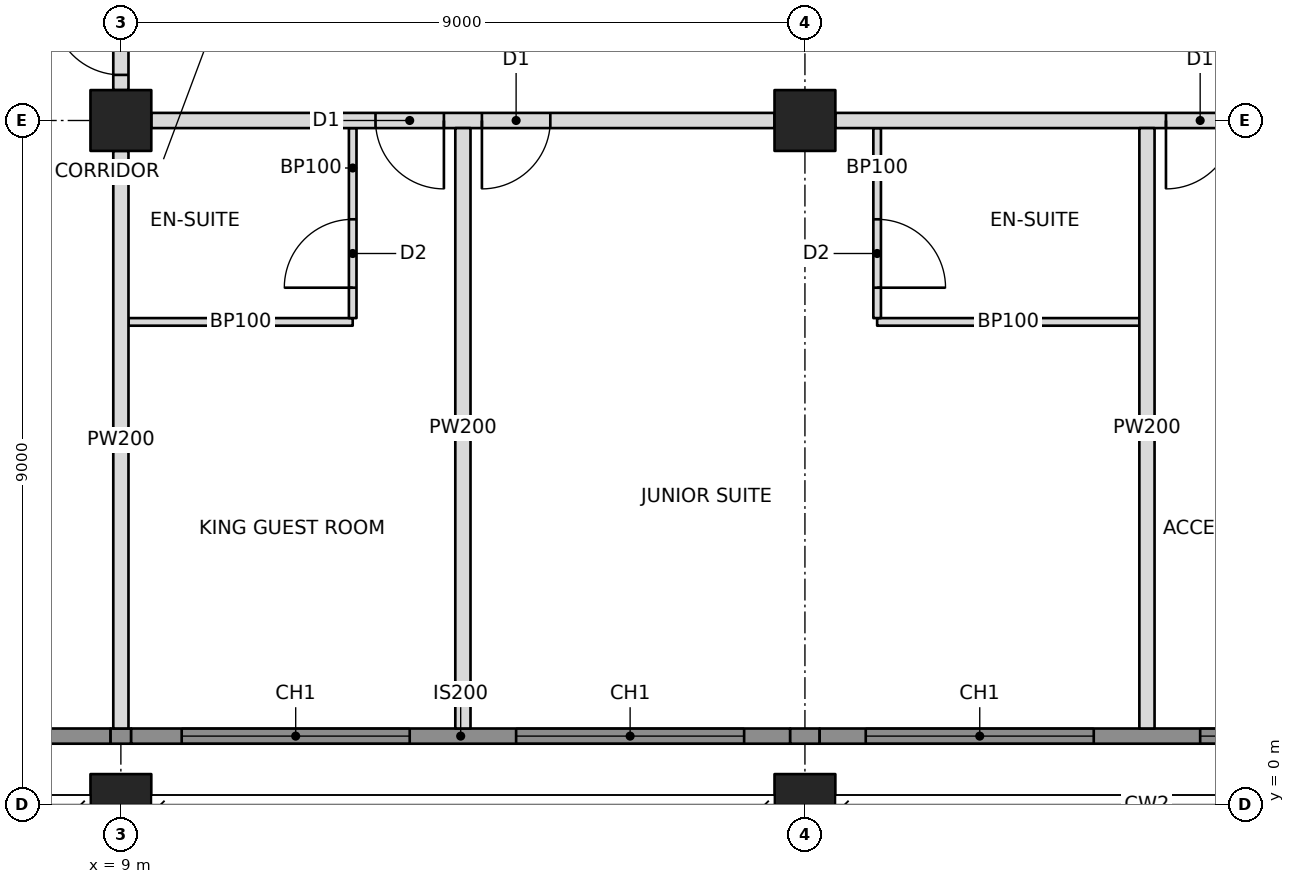
"""IFC4 building model, lengths in metres.
Left out: names, types, materials, properties, quantities, classifications, styles, units other than length and angle.
Written with IfcOpenShell. Run it as: python <this file> out.ifc"""

import sys

from ifc_helpers import new_model, si_unit, direction, frame, frame_2d, origin, origin_2d, place, context, subcontext, project, spatial, rectangle, hollow_rectangle, extrude, element, fill, save


model = new_model("IFC4")
c1 = context("Model", 3, precision=1e-05, world=origin(), true_north=direction((0.0, 1.0)))
c2 = subcontext(c1, "Body", "Model", "MODEL_VIEW")
j1 = project(units=[si_unit("LENGTHUNIT", "METRE"), si_unit("PLANEANGLEUNIT", "RADIAN")], contexts=[c1])
p1 = place(None, origin())
s1 = spatial("IfcSite", under=j1, at=p1, CompositionType="ELEMENT")
p2 = place(p1, origin())
s2 = spatial("IfcBuilding", under=s1, at=p2, CompositionType="ELEMENT")
p3 = place(p2, frame((0.0, 0.0, 237.4)))
s3 = spatial("IfcBuildingStorey", under=s2, at=p3, CompositionType="ELEMENT", Elevation=237.4)
p4 = place(p3, frame((9.0, 0.0, 0.0), z_axis=(0.0, 0.0, 1.0), x_axis=(1.0, 0.0, 0.0)))
e1 = element("IfcColumn", 1, at=p4, inside=s3, PredefinedType="COLUMN", context=c2, shape_type="SweptSolid", body=[
    extrude(hollow_rectangle(XDim=0.8, YDim=0.8, WallThickness=0.05, at=origin_2d()), origin(), (0.0, 0.0, 1.0), 3.6),
])
p5 = place(p3, frame((9.0, 9.0, 0.0), z_axis=(0.0, 0.0, 1.0), x_axis=(1.0, 0.0, 0.0)))
e2 = element("IfcColumn", 2, at=p5, inside=s3, PredefinedType="COLUMN", context=c2, shape_type="SweptSolid", body=[
    extrude(hollow_rectangle(XDim=0.8, YDim=0.8, WallThickness=0.04, at=origin_2d()), origin(), (0.0, 0.0, 1.0), 3.6),
])
p6 = place(p3, frame((18.0, 0.0, 0.0), z_axis=(0.0, 0.0, 1.0), x_axis=(1.0, 0.0, 0.0)))
e3 = element("IfcColumn", 3, at=p6, inside=s3, PredefinedType="COLUMN", context=c2, shape_type="SweptSolid", body=[
    extrude(hollow_rectangle(XDim=0.8, YDim=0.8, WallThickness=0.05, at=origin_2d()), origin(), (0.0, 0.0, 1.0), 3.6),
])
p7 = place(p3, frame((18.0, 9.0, 0.0), z_axis=(0.0, 0.0, 1.0), x_axis=(1.0, 0.0, 0.0)))
e4 = element("IfcColumn", 4, at=p7, inside=s3, PredefinedType="COLUMN", context=c2, shape_type="SweptSolid", body=[
    extrude(hollow_rectangle(XDim=0.8, YDim=0.8, WallThickness=0.04, at=origin_2d()), origin(), (0.0, 0.0, 1.0), 3.6),
])
p8 = place(p3, frame((3.0, 0.9, 0.0), z_axis=(0.0, 0.0, 1.0), x_axis=(1.0, 0.0, 0.0)))
e5 = element("IfcWall", 5, at=p8, inside=s3, PredefinedType="SOLIDWALL", context=c2, shape_type="SweptSolid", body=[
    extrude(rectangle(XDim=5.865, YDim=0.2, at=frame_2d((2.932, 0.0))), origin(), (0.0, 0.0, 1.0), 3.4),
])
p9 = place(p8, frame((1.45, 0.0, 0.6)))
e6 = element("IfcOpeningElement", 6, at=p9, cuts=e5, PredefinedType="OPENING", context=c2, shape_type="SweptSolid", body=[
    extrude(rectangle(XDim=3.0, YDim=2.2, at=frame_2d((1.5, 1.1))), frame((0.0, 0.11, 0.0), z_axis=(0.0, -1.0, 0.0), x_axis=(1.0, 0.0, 0.0)), (0.0, 0.0, 1.0), 0.22),
])
p10 = place(p3, frame((9.4, 9.0, 0.0), z_axis=(0.0, 0.0, 1.0), x_axis=(1.0, 0.0, 0.0)))
e7 = element("IfcWall", 7, at=p10, inside=s3, PredefinedType="PARTITIONING", context=c2, shape_type="SweptSolid", body=[
    extrude(rectangle(XDim=8.2, YDim=0.2, at=frame_2d((4.1, 0.0))), origin(), (0.0, 0.0, 1.0), 2.605),
])
p11 = place(p10, frame((2.95, 0.0, 0.0)))
e8 = element("IfcOpeningElement", 8, at=p11, cuts=e7, PredefinedType="OPENING", context=c2, shape_type="SweptSolid", body=[
    extrude(rectangle(XDim=0.9, YDim=2.1, at=frame_2d((0.45, 1.05))), frame((0.0, 0.11, 0.0), z_axis=(0.0, -1.0, 0.0), x_axis=(1.0, 0.0, 0.0)), (0.0, 0.0, 1.0), 0.22),
])
p12 = place(p10, frame((4.35, 0.0, 0.0)))
e9 = element("IfcOpeningElement", 9, at=p12, cuts=e7, PredefinedType="OPENING", context=c2, shape_type="SweptSolid", body=[
    extrude(rectangle(XDim=0.9, YDim=2.1, at=frame_2d((0.45, 1.05))), frame((0.0, 0.11, 0.0), z_axis=(0.0, -1.0, 0.0), x_axis=(1.0, 0.0, 0.0)), (0.0, 0.0, 1.0), 0.22),
])
p13 = place(p3, frame((18.4, 9.0, 0.0), z_axis=(0.0, 0.0, 1.0), x_axis=(1.0, 0.0, 0.0)))
e10 = element("IfcWall", 10, at=p13, inside=s3, PredefinedType="PARTITIONING", context=c2, shape_type="SweptSolid", body=[
    extrude(rectangle(XDim=8.2, YDim=0.2, at=frame_2d((4.1, 0.0))), origin(), (0.0, 0.0, 1.0), 2.605),
])
p14 = place(p13, frame((4.35, 0.0, 0.0)))
e11 = element("IfcOpeningElement", 11, at=p14, cuts=e10, PredefinedType="OPENING", context=c2, shape_type="SweptSolid", body=[
    extrude(rectangle(XDim=0.9, YDim=2.1, at=frame_2d((0.45, 1.05))), frame((0.0, 0.11, 0.0), z_axis=(0.0, -1.0, 0.0), x_axis=(1.0, 0.0, 0.0)), (0.0, 0.0, 1.0), 0.22),
])
p15 = place(p3, frame((9.0, 8.6, 0.0), z_axis=(0.0, 0.0, 1.0), x_axis=(0.0, -1.0, 0.0)))
e12 = element("IfcWall", 12, at=p15, inside=s3, PredefinedType="PARTITIONING", context=c2, shape_type="SweptSolid", body=[
    extrude(rectangle(XDim=7.6, YDim=0.2, at=frame_2d((3.8, 0.0))), origin(), (0.0, 0.0, 1.0), 2.638),
])
for number, where, z_axis, x_axis in (
    (13, (13.5, 8.9, 0.0), (0.0, 0.0, 1.0), (0.0, -1.0, 0.0)),
    (14, (22.5, 8.9, 0.0), (0.0, 0.0, 1.0), (0.0, -1.0, 0.0)),
):
    element("IfcWall", number, at=place(p3, frame(where, z_axis=z_axis, x_axis=x_axis)), inside=s3, PredefinedType="PARTITIONING", context=c2, shape_type="SweptSolid", body=[
        extrude(rectangle(XDim=7.9, YDim=0.2, at=frame_2d((3.95, 0.0))), origin(), (0.0, 0.0, 1.0), 2.604),
    ])
p16 = place(p3, frame((9.1, 6.35, 0.0), z_axis=(0.0, 0.0, 1.0), x_axis=(1.0, 0.0, 0.0)))
e15 = element("IfcWall", 15, at=p16, inside=s3, PredefinedType="PARTITIONING", context=c2, shape_type="SweptSolid", body=[
    extrude(rectangle(XDim=2.95, YDim=0.1, at=frame_2d((1.475, 0.0))), origin(), (0.0, 0.0, 1.0), 2.638),
])
p17 = place(p3, frame((12.05, 8.9, 0.0), z_axis=(0.0, 0.0, 1.0), x_axis=(0.0, -1.0, 0.0)))
e16 = element("IfcWall", 16, at=p17, inside=s3, PredefinedType="PARTITIONING", context=c2, shape_type="SweptSolid", body=[
    extrude(rectangle(XDim=2.5, YDim=0.1, at=frame_2d((1.25, 0.0))), origin(), (0.0, 0.0, 1.0), 2.604),
])
p18 = place(p17, frame((1.2, 0.0, 0.0)))
e17 = element("IfcOpeningElement", 17, at=p18, cuts=e16, PredefinedType="OPENING", context=c2, shape_type="SweptSolid", body=[
    extrude(rectangle(XDim=0.9, YDim=2.1, at=frame_2d((0.45, 1.05))), frame((0.0, 0.06, 0.0), z_axis=(0.0, -1.0, 0.0), x_axis=(1.0, 0.0, 0.0)), (0.0, 0.0, 1.0), 0.12),
])
p19 = place(p3, frame((18.95, 6.35, 0.0), z_axis=(0.0, 0.0, 1.0), x_axis=(1.0, 0.0, 0.0)))
e18 = element("IfcWall", 18, at=p19, inside=s3, PredefinedType="PARTITIONING", context=c2, shape_type="SweptSolid", body=[
    extrude(rectangle(XDim=3.45, YDim=0.1, at=frame_2d((1.725, 0.0))), origin(), (0.0, 0.0, 1.0), 3.4),
])
p20 = place(p3, frame((18.95, 8.9, 0.0), z_axis=(0.0, 0.0, 1.0), x_axis=(0.0, -1.0, 0.0)))
e19 = element("IfcWall", 19, at=p20, inside=s3, PredefinedType="PARTITIONING", context=c2, shape_type="SweptSolid", body=[
    extrude(rectangle(XDim=2.5, YDim=0.1, at=frame_2d((1.25, 0.0))), origin(), (0.0, 0.0, 1.0), 2.604),
])
p21 = place(p20, frame((1.2, 0.0, 0.0)))
e20 = element("IfcOpeningElement", 20, at=p21, cuts=e19, PredefinedType="OPENING", context=c2, shape_type="SweptSolid", body=[
    extrude(rectangle(XDim=0.9, YDim=2.1, at=frame_2d((0.45, 1.05))), frame((0.0, 0.06, 0.0), z_axis=(0.0, -1.0, 0.0), x_axis=(1.0, 0.0, 0.0)), (0.0, 0.0, 1.0), 0.12),
])
p22 = place(p3, frame((9.0, 9.4, 0.0), z_axis=(0.0, 0.0, 1.0), x_axis=(0.0, 1.0, 0.0)))
e21 = element("IfcWall", 21, at=p22, inside=s3, PredefinedType="PARTITIONING", context=c2, shape_type="SweptSolid", body=[
    extrude(rectangle(XDim=1.3, YDim=0.2, at=frame_2d((0.65, 0.0))), origin(), (0.0, 0.0, 1.0), 2.605),
])
p23 = place(p22, frame((0.2, 0.0, 0.0)))
e22 = element("IfcOpeningElement", 22, at=p23, cuts=e21, PredefinedType="OPENING", context=c2, shape_type="SweptSolid", body=[
    extrude(rectangle(XDim=0.9, YDim=2.1, at=frame_2d((0.45, 1.05))), frame((0.0, 0.11, 0.0), z_axis=(0.0, -1.0, 0.0), x_axis=(1.0, 0.0, 0.0)), (0.0, 0.0, 1.0), 0.22),
])
p24 = place(p3, frame((8.865, 0.9, 0.0), z_axis=(0.0, 0.0, 1.0), x_axis=(1.0, 0.0, 0.0)))
e23 = element("IfcWall", 23, at=p24, inside=s3, PredefinedType="SOLIDWALL", context=c2, shape_type="SweptSolid", body=[
    extrude(rectangle(XDim=0.271, YDim=0.2, at=frame_2d((0.135, 0.0))), origin(), (0.0, 0.0, 1.0), 2.638),
])
p25 = place(p3, frame((9.135, 0.9, 0.0), z_axis=(0.0, 0.0, 1.0), x_axis=(1.0, 0.0, 0.0)))
e24 = element("IfcWall", 24, at=p25, inside=s3, PredefinedType="SOLIDWALL", context=c2, shape_type="SweptSolid", body=[
    extrude(rectangle(XDim=8.671, YDim=0.2, at=frame_2d((4.335, 0.0))), origin(), (0.0, 0.0, 1.0), 3.4),
])
p26 = place(p25, frame((0.665, 0.0, 0.6)))
e25 = element("IfcOpeningElement", 25, at=p26, cuts=e24, PredefinedType="OPENING", context=c2, shape_type="SweptSolid", body=[
    extrude(rectangle(XDim=3.0, YDim=2.2, at=frame_2d((1.5, 1.1))), frame((0.0, 0.11, 0.0), z_axis=(0.0, -1.0, 0.0), x_axis=(1.0, 0.0, 0.0)), (0.0, 0.0, 1.0), 0.22),
])
p27 = place(p25, frame((5.065, 0.0, 0.6)))
e26 = element("IfcOpeningElement", 26, at=p27, cuts=e24, PredefinedType="OPENING", context=c2, shape_type="SweptSolid", body=[
    extrude(rectangle(XDim=3.0, YDim=2.2, at=frame_2d((1.5, 1.1))), frame((0.0, 0.11, 0.0), z_axis=(0.0, -1.0, 0.0), x_axis=(1.0, 0.0, 0.0)), (0.0, 0.0, 1.0), 0.22),
])
p28 = place(p3, frame((17.806, 0.9, 0.0), z_axis=(0.0, 0.0, 1.0), x_axis=(1.0, 0.0, 0.0)))
e27 = element("IfcWall", 27, at=p28, inside=s3, PredefinedType="SOLIDWALL", context=c2, shape_type="SweptSolid", body=[
    extrude(rectangle(XDim=0.388, YDim=0.2, at=frame_2d((0.194, 0.0))), origin(), (0.0, 0.0, 1.0), 2.604),
])
p29 = place(p3, frame((18.194, 0.9, 0.0), z_axis=(0.0, 0.0, 1.0), x_axis=(1.0, 0.0, 0.0)))
e28 = element("IfcWall", 28, at=p29, inside=s3, PredefinedType="SOLIDWALL", context=c2, shape_type="SweptSolid", body=[
    extrude(rectangle(XDim=8.612, YDim=0.2, at=frame_2d((4.306, 0.0))), origin(), (0.0, 0.0, 1.0), 3.4),
])
p30 = place(p29, frame((0.606, 0.0, 0.6)))
e29 = element("IfcOpeningElement", 29, at=p30, cuts=e28, PredefinedType="OPENING", context=c2, shape_type="SweptSolid", body=[
    extrude(rectangle(XDim=3.0, YDim=2.2, at=frame_2d((1.5, 1.1))), frame((0.0, 0.11, 0.0), z_axis=(0.0, -1.0, 0.0), x_axis=(1.0, 0.0, 0.0)), (0.0, 0.0, 1.0), 0.22),
])
p31 = place(p29, frame((5.006, 0.0, 0.6)))
e30 = element("IfcOpeningElement", 30, at=p31, cuts=e28, PredefinedType="OPENING", context=c2, shape_type="SweptSolid", body=[
    extrude(rectangle(XDim=3.0, YDim=2.2, at=frame_2d((1.5, 1.1))), frame((0.0, 0.11, 0.0), z_axis=(0.0, -1.0, 0.0), x_axis=(1.0, 0.0, 0.0)), (0.0, 0.0, 1.0), 0.22),
])
p32 = place(p26, origin())
e31 = element("IfcWindow", 31, at=p32, inside=s3, PartitioningType="TRIPLE_PANEL_VERTICAL", PredefinedType="WINDOW", context=c2, shape_type="SweptSolid", body=[
    extrude(rectangle(XDim=3.0, YDim=2.2, at=frame_2d((1.5, 1.1))), frame((0.0, 0.03, 0.0), z_axis=(0.0, -1.0, 0.0), x_axis=(1.0, 0.0, 0.0)), (0.0, 0.0, 1.0), 0.06),
])
fill(e25, e31)
p33 = place(p27, origin())
e32 = element("IfcWindow", 32, at=p33, inside=s3, PartitioningType="TRIPLE_PANEL_VERTICAL", PredefinedType="WINDOW", context=c2, shape_type="SweptSolid", body=[
    extrude(rectangle(XDim=3.0, YDim=2.2, at=frame_2d((1.5, 1.1))), frame((0.0, 0.03, 0.0), z_axis=(0.0, -1.0, 0.0), x_axis=(1.0, 0.0, 0.0)), (0.0, 0.0, 1.0), 0.06),
])
fill(e26, e32)
p34 = place(p30, origin())
e33 = element("IfcWindow", 33, at=p34, inside=s3, PartitioningType="TRIPLE_PANEL_VERTICAL", PredefinedType="WINDOW", context=c2, shape_type="SweptSolid", body=[
    extrude(rectangle(XDim=3.0, YDim=2.2, at=frame_2d((1.5, 1.1))), frame((0.0, 0.03, 0.0), z_axis=(0.0, -1.0, 0.0), x_axis=(1.0, 0.0, 0.0)), (0.0, 0.0, 1.0), 0.06),
])
fill(e29, e33)
p35 = place(p31, origin())
e34 = element("IfcWindow", 34, at=p35, inside=s3, PartitioningType="TRIPLE_PANEL_VERTICAL", PredefinedType="WINDOW", context=c2, shape_type="SweptSolid", body=[
    extrude(rectangle(XDim=3.0, YDim=2.2, at=frame_2d((1.5, 1.1))), frame((0.0, 0.03, 0.0), z_axis=(0.0, -1.0, 0.0), x_axis=(1.0, 0.0, 0.0)), (0.0, 0.0, 1.0), 0.06),
])
fill(e30, e34)
p36 = place(p18, frame((0.9, 0.0, 0.0), z_axis=(0.0, 0.0, 1.0), x_axis=(-1.0, 0.0, 0.0)))
e35 = element("IfcDoor", 35, at=p36, inside=s3, OperationType="SINGLE_SWING_LEFT", PredefinedType="DOOR", context=c2, shape_type="SweptSolid", body=[
    extrude(rectangle(XDim=0.9, YDim=2.1, at=frame_2d((0.45, 1.05))), frame((0.0, 0.025, 0.0), z_axis=(0.0, -1.0, 0.0), x_axis=(1.0, 0.0, 0.0)), (0.0, 0.0, 1.0), 0.05),
])
fill(e17, e35)
p37 = place(p11, frame((0.9, 0.0, 0.0), z_axis=(0.0, 0.0, 1.0), x_axis=(-1.0, 0.0, 0.0)))
e36 = element("IfcDoor", 36, at=p37, inside=s3, OperationType="SINGLE_SWING_LEFT", PredefinedType="DOOR", context=c2, shape_type="SweptSolid", body=[
    extrude(rectangle(XDim=0.9, YDim=2.1, at=frame_2d((0.45, 1.05))), frame((0.0, 0.025, 0.0), z_axis=(0.0, -1.0, 0.0), x_axis=(1.0, 0.0, 0.0)), (0.0, 0.0, 1.0), 0.05),
])
fill(e8, e36)
p38 = place(p21, origin())
e37 = element("IfcDoor", 37, at=p38, inside=s3, OperationType="SINGLE_SWING_RIGHT", PredefinedType="DOOR", context=c2, shape_type="SweptSolid", body=[
    extrude(rectangle(XDim=0.9, YDim=2.1, at=frame_2d((0.45, 1.05))), frame((0.0, 0.025, 0.0), z_axis=(0.0, -1.0, 0.0), x_axis=(1.0, 0.0, 0.0)), (0.0, 0.0, 1.0), 0.05),
])
fill(e20, e37)
p39 = place(p12, frame((0.9, 0.0, 0.0), z_axis=(0.0, 0.0, 1.0), x_axis=(-1.0, 0.0, 0.0)))
e38 = element("IfcDoor", 38, at=p39, inside=s3, OperationType="SINGLE_SWING_RIGHT", PredefinedType="DOOR", context=c2, shape_type="SweptSolid", body=[
    extrude(rectangle(XDim=0.9, YDim=2.1, at=frame_2d((0.45, 1.05))), frame((0.0, 0.025, 0.0), z_axis=(0.0, -1.0, 0.0), x_axis=(1.0, 0.0, 0.0)), (0.0, 0.0, 1.0), 0.05),
])
fill(e9, e38)
p40 = place(p14, frame((0.9, 0.0, 0.0), z_axis=(0.0, 0.0, 1.0), x_axis=(-1.0, 0.0, 0.0)))
e39 = element("IfcDoor", 39, at=p40, inside=s3, OperationType="SINGLE_SWING_RIGHT", PredefinedType="DOOR", context=c2, shape_type="SweptSolid", body=[
    extrude(rectangle(XDim=0.9, YDim=2.1, at=frame_2d((0.45, 1.05))), frame((0.0, 0.025, 0.0), z_axis=(0.0, -1.0, 0.0), x_axis=(1.0, 0.0, 0.0)), (0.0, 0.0, 1.0), 0.05),
])
fill(e11, e39)
p41 = place(p23, origin())
e40 = element("IfcDoor", 40, at=p41, inside=s3, OperationType="SINGLE_SWING_RIGHT", PredefinedType="DOOR", context=c2, shape_type="SweptSolid", body=[
    extrude(rectangle(XDim=0.9, YDim=2.1, at=frame_2d((0.45, 1.05))), frame((0.0, 0.025, 0.0), z_axis=(0.0, -1.0, 0.0), x_axis=(1.0, 0.0, 0.0)), (0.0, 0.0, 1.0), 0.05),
])
fill(e22, e40)
save(model, sys.argv[1])
